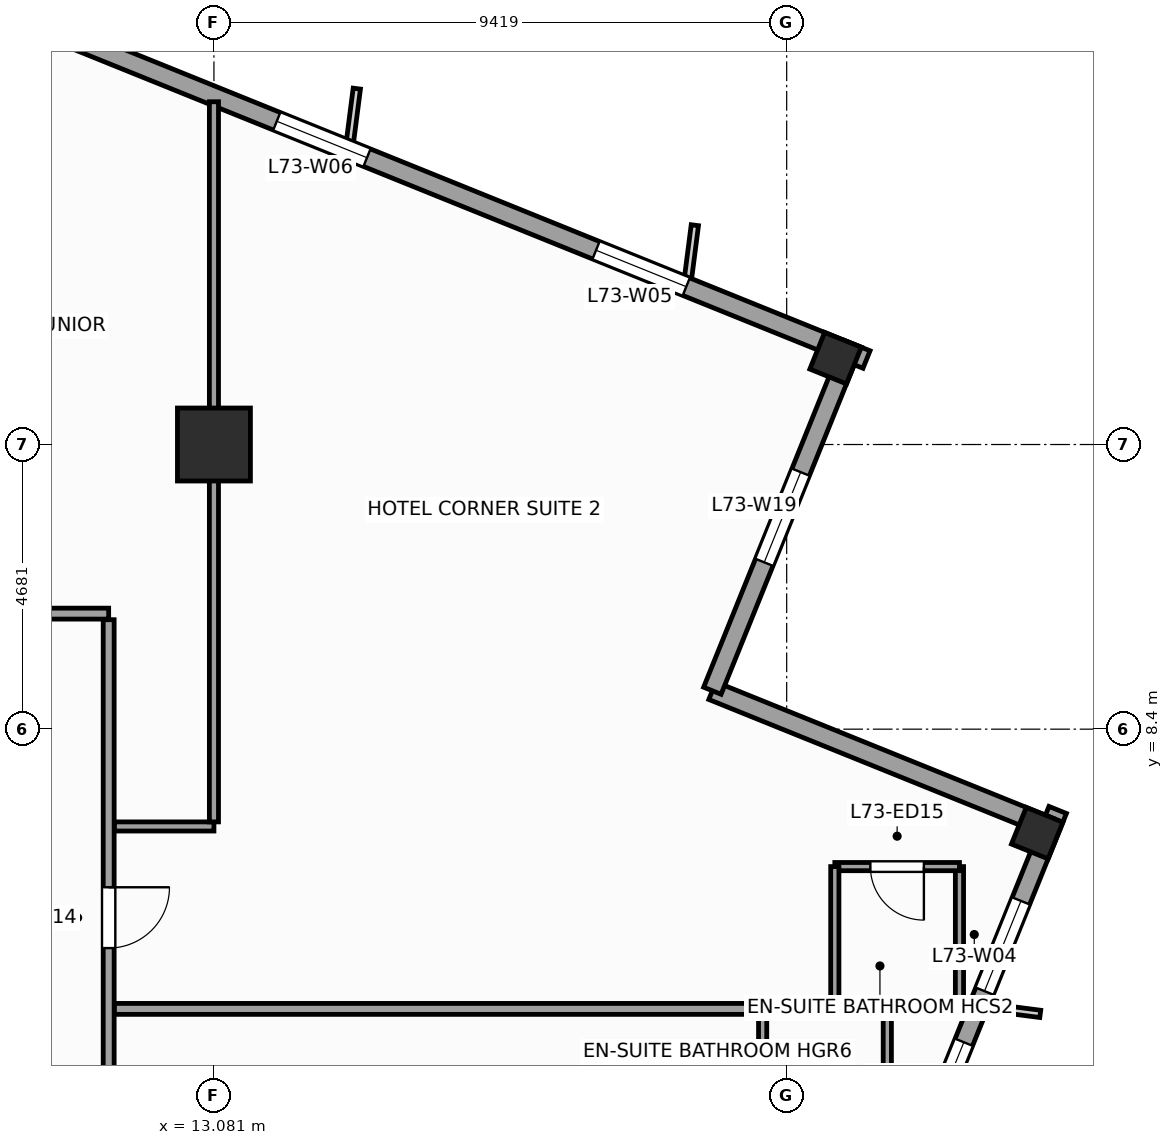
"""IFC4 building model, lengths in metres.
Left out: names, types, materials, properties, quantities, classifications, styles, units other than length and angle.
Written with IfcOpenShell. Run it as: python <this file> out.ifc"""

import sys

from ifc_helpers import new_model, si_unit, direction, frame, frame_2d, origin, origin_2d, place, context, subcontext, project, spatial, rectangle, extrude, source, transform, mapped, element, fill, save


model = new_model("IFC4")
c1 = context("Model", 3, precision=1e-05, world=origin(), true_north=direction((0.0, 1.0)))
c2 = subcontext(c1, "Body", "Model", "MODEL_VIEW")
j1 = project(units=[si_unit("LENGTHUNIT", "METRE"), si_unit("PLANEANGLEUNIT", "RADIAN")], contexts=[c1])
p1 = place(None, origin())
s1 = spatial("IfcSite", under=j1, at=p1, CompositionType="ELEMENT")
p2 = place(p1, origin())
s2 = spatial("IfcBuilding", under=s1, at=p2, CompositionType="ELEMENT")
p3 = place(p2, frame((0.0, 0.0, 297.6)))
s3 = spatial("IfcBuildingStorey", under=s2, at=p3, CompositionType="ELEMENT", Elevation=297.6)
m1 = source(origin(), c2, "Body", "SweptSolid", [
    extrude(rectangle(XDim=1.2, YDim=1.2, at=origin_2d()), origin(), (0.0, 0.0, 1.0), 3.6),
])
p4 = place(p3, frame((13.081, 13.081, 0.0), z_axis=(0.0, 0.0, 1.0), x_axis=(1.0, 0.0, 0.0)))
e1 = element("IfcColumn", 1, at=p4, inside=s3, PredefinedType="COLUMN", context=c2, shape_type="MappedRepresentation", body=[
    mapped(m1, transform((0.0, 0.0, 0.0), scale=1.0)),
])
m2 = source(origin(), c2, "Body", "SweptSolid", [
    extrude(rectangle(XDim=0.65, YDim=0.65, at=origin_2d()), origin(), (0.0, 0.0, 1.0), 3.6),
])
for number, where, z_axis, x_axis in (
    (2, (26.62, 6.69, 0.0), (0.0, 0.0, 1.0), (0.375, 0.927, 0.0)),
    (3, (23.304, 14.501, 0.0), (0.0, 0.0, 1.0), (0.375, 0.927, 0.0)),
):
    element("IfcColumn", number, at=place(p3, frame(where, z_axis=z_axis, x_axis=x_axis)), inside=s3, PredefinedType="COLUMN", context=c2, shape_type="MappedRepresentation", body=[
        mapped(m2, transform((0.0, 0.0, 0.0), scale=1.0)),
    ])
p5 = place(p3, frame((14.479, -23.813, 0.0), z_axis=(0.0, 0.0, 1.0), x_axis=(0.374609557019, 0.927182657188, 0.0)))
e4 = element("IfcWall", 4, at=p5, inside=s3, PredefinedType="STANDARD", context=c2, shape_type="SweptSolid", body=[
    extrude(rectangle(XDim=33.31, YDim=0.31, at=frame_2d((16.655, 0.0))), origin(), (0.0, 0.0, 1.0), 2.75),
])
p6 = place(p5, frame((3.197, 0.0, 0.47)))
e5 = element("IfcOpeningElement", 5, at=p6, cuts=e4, PredefinedType="OPENING", context=c2, shape_type="SweptSolid", body=[
    extrude(rectangle(XDim=1.6, YDim=2.1, at=frame_2d((0.8, 1.05))), frame((0.0, 0.165, 0.0), z_axis=(0.0, -1.0, 0.0), x_axis=(1.0, 0.0, 0.0)), (0.0, 0.0, 1.0), 0.33),
])
p7 = place(p5, frame((8.86, 0.0, 0.47)))
e6 = element("IfcOpeningElement", 6, at=p7, cuts=e4, PredefinedType="OPENING", context=c2, shape_type="SweptSolid", body=[
    extrude(rectangle(XDim=1.6, YDim=2.1, at=frame_2d((0.8, 1.05))), frame((0.0, 0.165, 0.0), z_axis=(0.0, -1.0, 0.0), x_axis=(1.0, 0.0, 0.0)), (0.0, 0.0, 1.0), 0.33),
])
p8 = place(p5, frame((14.439, 0.0, 0.47)))
e7 = element("IfcOpeningElement", 7, at=p8, cuts=e4, PredefinedType="OPENING", context=c2, shape_type="SweptSolid", body=[
    extrude(rectangle(XDim=1.6, YDim=2.1, at=frame_2d((0.8, 1.05))), frame((0.0, 0.165, 0.0), z_axis=(0.0, -1.0, 0.0), x_axis=(1.0, 0.0, 0.0)), (0.0, 0.0, 1.0), 0.33),
])
p9 = place(p5, frame((30.097, 0.0, 0.47)))
e8 = element("IfcOpeningElement", 8, at=p9, cuts=e4, PredefinedType="OPENING", context=c2, shape_type="SweptSolid", body=[
    extrude(rectangle(XDim=1.6, YDim=2.1, at=frame_2d((0.8, 1.05))), frame((0.0, 0.165, 0.0), z_axis=(0.0, -1.0, 0.0), x_axis=(1.0, 0.0, 0.0)), (0.0, 0.0, 1.0), 0.33),
])
p10 = place(p5, frame((27.59, 0.0, 0.47)))
e9 = element("IfcOpeningElement", 9, at=p10, cuts=e4, PredefinedType="OPENING", context=c2, shape_type="SweptSolid", body=[
    extrude(rectangle(XDim=1.6, YDim=2.1, at=frame_2d((0.8, 1.05))), frame((0.0, 0.165, 0.0), z_axis=(0.0, -1.0, 0.0), x_axis=(1.0, 0.0, 0.0)), (0.0, 0.0, 1.0), 0.33),
])
p11 = place(p5, frame((22.952, 0.0, 0.47)))
e10 = element("IfcOpeningElement", 10, at=p11, cuts=e4, PredefinedType="OPENING", context=c2, shape_type="SweptSolid", body=[
    extrude(rectangle(XDim=1.6, YDim=2.1, at=frame_2d((0.8, 1.05))), frame((0.0, 0.165, 0.0), z_axis=(0.0, -1.0, 0.0), x_axis=(1.0, 0.0, 0.0)), (0.0, 0.0, 1.0), 0.33),
])
p12 = place(p3, frame((26.841, 6.784, 0.0), z_axis=(0.0, 0.0, 1.0), x_axis=(-0.927171722085, 0.374636620962, 0.0)))
e11 = element("IfcWall", 11, at=p12, inside=s3, PredefinedType="STANDARD", context=c2, shape_type="SweptSolid", body=[
    extrude(rectangle(XDim=6.0, YDim=0.31, at=frame_2d((3.0, 0.0))), origin(), (0.0, 0.0, 1.0), 2.65),
])
p13 = place(p3, frame((21.278, 9.032, 0.0), z_axis=(0.0, 0.0, 1.0), x_axis=(0.374602739196, 0.927185411764, 0.0)))
e12 = element("IfcWall", 12, at=p13, inside=s3, PredefinedType="STANDARD", context=c2, shape_type="SweptSolid", body=[
    extrude(rectangle(XDim=6.155, YDim=0.31, at=frame_2d((3.078, 0.0))), origin(), (0.0, 0.0, 1.0), 3.35),
])
p14 = place(p13, frame((2.278, 0.0, 0.47)))
e13 = element("IfcOpeningElement", 13, at=p14, cuts=e12, PredefinedType="OPENING", context=c2, shape_type="SweptSolid", body=[
    extrude(rectangle(XDim=1.6, YDim=2.1, at=frame_2d((0.8, 1.05))), frame((0.0, 0.165, 0.0), z_axis=(0.0, -1.0, 0.0), x_axis=(1.0, 0.0, 0.0)), (0.0, 0.0, 1.0), 0.33),
])
p15 = place(p3, frame((23.813, 14.479, 0.0), z_axis=(0.0, 0.0, 1.0), x_axis=(-0.927182657188, 0.374609557019, 0.0)))
e14 = element("IfcWall", 14, at=p15, inside=s3, PredefinedType="STANDARD", context=c2, shape_type="SweptSolid", body=[
    extrude(rectangle(XDim=33.31, YDim=0.31, at=frame_2d((16.655, 0.0))), origin(), (0.0, 0.0, 1.0), 2.75),
])
p16 = place(p15, frame((22.58, 0.0, 0.0)))
e15 = element("IfcOpeningElement", 15, at=p16, cuts=e14, PredefinedType="OPENING", context=c2, shape_type="SweptSolid", body=[
    extrude(rectangle(XDim=1.05, YDim=2.25, at=frame_2d((0.525, 1.125))), frame((0.0, 0.165, 0.0), z_axis=(0.0, -1.0, 0.0), x_axis=(1.0, 0.0, 0.0)), (0.0, 0.0, 1.0), 0.33),
])
p17 = place(p15, frame((3.197, 0.0, 0.47)))
e16 = element("IfcOpeningElement", 16, at=p17, cuts=e14, PredefinedType="OPENING", context=c2, shape_type="SweptSolid", body=[
    extrude(rectangle(XDim=1.6, YDim=2.1, at=frame_2d((0.8, 1.05))), frame((0.0, 0.165, 0.0), z_axis=(0.0, -1.0, 0.0), x_axis=(1.0, 0.0, 0.0)), (0.0, 0.0, 1.0), 0.33),
])
p18 = place(p15, frame((8.86, 0.0, 0.47)))
e17 = element("IfcOpeningElement", 17, at=p18, cuts=e14, PredefinedType="OPENING", context=c2, shape_type="SweptSolid", body=[
    extrude(rectangle(XDim=1.6, YDim=2.1, at=frame_2d((0.8, 1.05))), frame((0.0, 0.165, 0.0), z_axis=(0.0, -1.0, 0.0), x_axis=(1.0, 0.0, 0.0)), (0.0, 0.0, 1.0), 0.33),
])
p19 = place(p15, frame((14.439, 0.0, 0.47)))
e18 = element("IfcOpeningElement", 18, at=p19, cuts=e14, PredefinedType="OPENING", context=c2, shape_type="SweptSolid", body=[
    extrude(rectangle(XDim=1.6, YDim=2.1, at=frame_2d((0.8, 1.05))), frame((0.0, 0.165, 0.0), z_axis=(0.0, -1.0, 0.0), x_axis=(1.0, 0.0, 0.0)), (0.0, 0.0, 1.0), 0.33),
])
p20 = place(p15, frame((25.597, 0.0, 0.47)))
e19 = element("IfcOpeningElement", 19, at=p20, cuts=e14, PredefinedType="OPENING", context=c2, shape_type="SweptSolid", body=[
    extrude(rectangle(XDim=1.6, YDim=2.1, at=frame_2d((0.8, 1.05))), frame((0.0, 0.165, 0.0), z_axis=(0.0, -1.0, 0.0), x_axis=(1.0, 0.0, 0.0)), (0.0, 0.0, 1.0), 0.33),
])
p21 = place(p3, frame((-10.3, 10.3, 0.0), z_axis=(0.0, 0.0, 1.0), x_axis=(1.0, 0.0, 0.0)))
e20 = element("IfcWall", 20, at=p21, inside=s3, PredefinedType="PARTITIONING", context=c2, shape_type="SweptSolid", body=[
    extrude(rectangle(XDim=21.65, YDim=0.18, at=frame_2d((10.825, 0.0))), origin(), (0.0, 0.0, 1.0), 3.35),
])
p22 = place(p21, frame((2.564, 0.0, 0.0)))
e21 = element("IfcOpeningElement", 21, at=p22, cuts=e20, PredefinedType="OPENING", context=c2, shape_type="SweptSolid", body=[
    extrude(rectangle(XDim=1.0, YDim=2.15, at=frame_2d((0.5, 1.075))), frame((0.0, 0.1, 0.0), z_axis=(0.0, -1.0, 0.0), x_axis=(1.0, 0.0, 0.0)), (0.0, 0.0, 1.0), 0.2),
])
p23 = place(p21, frame((8.05, 0.0, 0.0)))
e22 = element("IfcOpeningElement", 22, at=p23, cuts=e20, PredefinedType="OPENING", context=c2, shape_type="SweptSolid", body=[
    extrude(rectangle(XDim=1.0, YDim=2.15, at=frame_2d((0.5, 1.075))), frame((0.0, 0.1, 0.0), z_axis=(0.0, -1.0, 0.0), x_axis=(1.0, 0.0, 0.0)), (0.0, 0.0, 1.0), 0.2),
])
p24 = place(p21, frame((12.54, 0.0, 0.0)))
e23 = element("IfcOpeningElement", 23, at=p24, cuts=e20, PredefinedType="OPENING", context=c2, shape_type="SweptSolid", body=[
    extrude(rectangle(XDim=1.0, YDim=2.15, at=frame_2d((0.5, 1.075))), frame((0.0, 0.1, 0.0), z_axis=(0.0, -1.0, 0.0), x_axis=(1.0, 0.0, 0.0)), (0.0, 0.0, 1.0), 0.2),
])
p25 = place(p21, frame((18.871, 0.0, 0.0)))
e24 = element("IfcOpeningElement", 24, at=p25, cuts=e20, PredefinedType="OPENING", context=c2, shape_type="SweptSolid", body=[
    extrude(rectangle(XDim=1.0, YDim=2.15, at=frame_2d((0.5, 1.075))), frame((0.0, 0.1, 0.0), z_axis=(0.0, -1.0, 0.0), x_axis=(1.0, 0.0, 0.0)), (0.0, 0.0, 1.0), 0.2),
])
p26 = place(p3, frame((11.35, -12.35, 0.0), z_axis=(0.0, 0.0, 1.0), x_axis=(0.0, 1.0, 0.0)))
e25 = element("IfcWall", 25, at=p26, inside=s3, PredefinedType="PARTITIONING", context=c2, shape_type="SweptSolid", body=[
    extrude(rectangle(XDim=22.55, YDim=0.18, at=frame_2d((11.275, 0.0))), origin(), (0.0, 0.0, 1.0), 3.35),
])
p27 = place(p26, frame((17.15, 0.0, 0.0)))
e26 = element("IfcOpeningElement", 26, at=p27, cuts=e25, PredefinedType="OPENING", context=c2, shape_type="SweptSolid", body=[
    extrude(rectangle(XDim=1.0, YDim=2.15, at=frame_2d((0.5, 1.075))), frame((0.0, 0.1, 0.0), z_axis=(0.0, -1.0, 0.0), x_axis=(1.0, 0.0, 0.0)), (0.0, 0.0, 1.0), 0.2),
])
p28 = place(p26, frame((13.5, 0.0, 0.0)))
e27 = element("IfcOpeningElement", 27, at=p28, cuts=e25, PredefinedType="OPENING", context=c2, shape_type="SweptSolid", body=[
    extrude(rectangle(XDim=1.0, YDim=2.15, at=frame_2d((0.5, 1.075))), frame((0.0, 0.1, 0.0), z_axis=(0.0, -1.0, 0.0), x_axis=(1.0, 0.0, 0.0)), (0.0, 0.0, 1.0), 0.2),
])
p29 = place(p26, frame((9.5, 0.0, 0.0)))
e28 = element("IfcOpeningElement", 28, at=p29, cuts=e25, PredefinedType="OPENING", context=c2, shape_type="SweptSolid", body=[
    extrude(rectangle(XDim=1.0, YDim=2.15, at=frame_2d((0.5, 1.075))), frame((0.0, 0.1, 0.0), z_axis=(0.0, -1.0, 0.0), x_axis=(1.0, 0.0, 0.0)), (0.0, 0.0, 1.0), 0.2),
])
p30 = place(p26, frame((6.35, 0.0, 0.0)))
e29 = element("IfcOpeningElement", 29, at=p30, cuts=e25, PredefinedType="OPENING", context=c2, shape_type="SweptSolid", body=[
    extrude(rectangle(XDim=1.0, YDim=2.15, at=frame_2d((0.5, 1.075))), frame((0.0, 0.1, 0.0), z_axis=(0.0, -1.0, 0.0), x_axis=(1.0, 0.0, 0.0)), (0.0, 0.0, 1.0), 0.2),
])
p31 = place(p26, frame((2.439, 0.0, 0.0)))
e30 = element("IfcOpeningElement", 30, at=p31, cuts=e25, PredefinedType="OPENING", context=c2, shape_type="SweptSolid", body=[
    extrude(rectangle(XDim=1.0, YDim=2.15, at=frame_2d((0.5, 1.075))), frame((0.0, 0.1, 0.0), z_axis=(0.0, -1.0, 0.0), x_axis=(1.0, 0.0, 0.0)), (0.0, 0.0, 1.0), 0.2),
])
p32 = place(p3, frame((11.445, 3.8, 0.0), z_axis=(0.0, 0.0, 1.0), x_axis=(1.0, 0.0, 0.0)))
e31 = element("IfcWall", 31, at=p32, inside=s3, PredefinedType="PARTITIONING", context=c2, shape_type="SweptSolid", body=[
    extrude(rectangle(XDim=14.093, YDim=0.18, at=frame_2d((7.046, 0.0))), origin(), (0.0, 0.0, 1.0), 3.35),
])
p33 = place(p3, frame((11.445, 6.8, 0.0), z_axis=(0.0, 0.0, 1.0), x_axis=(1.0, 0.0, 0.0)))
e32 = element("IfcWall", 32, at=p33, inside=s3, PredefinedType="PARTITIONING", context=c2, shape_type="SweptSolid", body=[
    extrude(rectangle(XDim=1.636, YDim=0.15, at=frame_2d((0.818, 0.0))), origin(), (0.0, 0.0, 1.0), 3.35),
])
p34 = place(p3, frame((13.081, 6.875, 0.0), z_axis=(0.0, 0.0, 1.0), x_axis=(0.0, 1.0, 0.0)))
e33 = element("IfcWall", 33, at=p34, inside=s3, PredefinedType="PARTITIONING", context=c2, shape_type="SweptSolid", body=[
    extrude(rectangle(XDim=11.843, YDim=0.15, at=frame_2d((5.921, 0.0))), origin(), (0.0, 0.0, 1.0), 2.45),
])
p35 = place(p3, frame((25.342, 3.89, 0.0), z_axis=(0.0, 0.0, 1.0), x_axis=(0.0, 1.0, 0.0)))
e34 = element("IfcWall", 34, at=p35, inside=s3, PredefinedType="PARTITIONING", context=c2, shape_type="SweptSolid", body=[
    extrude(rectangle(XDim=2.25, YDim=0.135, at=frame_2d((1.125, 0.0))), origin(), (0.0, 0.0, 1.0), 2.75),
])
p36 = place(p3, frame((23.292, 6.14, 0.0), z_axis=(0.0, 0.0, 1.0), x_axis=(1.0, 0.0, 0.0)))
e35 = element("IfcWall", 35, at=p36, inside=s3, PredefinedType="PARTITIONING", context=c2, shape_type="SweptSolid", body=[
    extrude(rectangle(XDim=2.05, YDim=0.135, at=frame_2d((1.025, 0.0))), origin(), (0.0, 0.0, 1.0), 3.35),
])
p37 = place(p36, frame((0.585, 0.0, 0.0)))
e36 = element("IfcOpeningElement", 36, at=p37, cuts=e35, PredefinedType="OPENING", context=c2, shape_type="SweptSolid", body=[
    extrude(rectangle(XDim=0.88, YDim=2.1, at=frame_2d((0.44, 1.05))), frame((0.0, 0.078, 0.0), z_axis=(0.0, -1.0, 0.0), x_axis=(1.0, 0.0, 0.0)), (0.0, 0.0, 1.0), 0.155),
])
p38 = place(p3, frame((23.292, 3.89, 0.0), z_axis=(0.0, 0.0, 1.0), x_axis=(0.0, 1.0, 0.0)))
e37 = element("IfcWall", 37, at=p38, inside=s3, PredefinedType="PARTITIONING", context=c2, shape_type="SweptSolid", body=[
    extrude(rectangle(XDim=2.25, YDim=0.135, at=frame_2d((1.125, 0.0))), origin(), (0.0, 0.0, 1.0), 2.95),
])
for number, where, z_axis, x_axis in (
    (38, (24.155, 1.46, 0.0), (0.0, 0.0, 1.0), (0.0, 1.0, 0.0)),
    (39, (22.105, 1.46, 0.0), (0.0, 0.0, 1.0), (0.0, 1.0, 0.0)),
):
    element("IfcWall", number, at=place(p3, frame(where, z_axis=z_axis, x_axis=x_axis)), inside=s3, PredefinedType="PARTITIONING", context=c2, shape_type="SweptSolid", body=[
        extrude(rectangle(XDim=2.25, YDim=0.135, at=frame_2d((1.125, 0.0))), origin(), (0.0, 0.0, 1.0), 3.35),
    ])
m3 = source(origin(), c2, "Body", "SweptSolid", [
    extrude(rectangle(XDim=1.6, YDim=2.1, at=frame_2d((0.8, 1.05))), frame((0.0, 0.03, 0.0), z_axis=(0.0, -1.0, 0.0), x_axis=(1.0, 0.0, 0.0)), (0.0, 0.0, 1.0), 0.06),
])
p39 = place(p9, origin())
e40 = element("IfcWindow", 40, at=p39, inside=s3, PartitioningType="SINGLE_PANEL", PredefinedType="WINDOW", context=c2, shape_type="MappedRepresentation", body=[
    mapped(m3, transform((0.0, 0.0, 0.0), scale=1.0)),
])
fill(e8, e40)
p40 = place(p17, origin())
e41 = element("IfcWindow", 41, at=p40, inside=s3, PartitioningType="SINGLE_PANEL", PredefinedType="WINDOW", context=c2, shape_type="MappedRepresentation", body=[
    mapped(m3, transform((0.0, 0.0, 0.0), scale=1.0)),
])
fill(e16, e41)
p41 = place(p18, origin())
e42 = element("IfcWindow", 42, at=p41, inside=s3, PartitioningType="SINGLE_PANEL", PredefinedType="WINDOW", context=c2, shape_type="MappedRepresentation", body=[
    mapped(m3, transform((0.0, 0.0, 0.0), scale=1.0)),
])
fill(e17, e42)
p42 = place(p14, origin())
e43 = element("IfcWindow", 43, at=p42, inside=s3, PartitioningType="SINGLE_PANEL", PredefinedType="WINDOW", context=c2, shape_type="MappedRepresentation", body=[
    mapped(m3, transform((0.0, 0.0, 0.0), scale=1.0)),
])
fill(e13, e43)
m4 = source(origin(), c2, "Body", "SweptSolid", [
    extrude(rectangle(XDim=1.0, YDim=2.15, at=frame_2d((0.5, 1.075))), frame((0.0, 0.025, 0.0), z_axis=(0.0, -1.0, 0.0), x_axis=(1.0, 0.0, 0.0)), (0.0, 0.0, 1.0), 0.05),
])
p43 = place(p27, frame((1.0, 0.0, 0.0), z_axis=(0.0, 0.0, 1.0), x_axis=(-1.0, 0.0, 0.0)))
e44 = element("IfcDoor", 44, at=p43, inside=s3, OperationType="SINGLE_SWING_RIGHT", PredefinedType="DOOR", context=c2, shape_type="MappedRepresentation", body=[
    mapped(m4, transform((0.0, 0.0, 0.0), scale=1.0)),
])
fill(e26, e44)
m5 = source(origin(), c2, "Body", "SweptSolid", [
    extrude(rectangle(XDim=0.88, YDim=2.1, at=frame_2d((0.44, 1.05))), frame((0.0, 0.025, 0.0), z_axis=(0.0, -1.0, 0.0), x_axis=(1.0, 0.0, 0.0)), (0.0, 0.0, 1.0), 0.05),
])
p44 = place(p37, frame((0.88, 0.0, 0.0), z_axis=(0.0, 0.0, 1.0), x_axis=(-1.0, 0.0, 0.0)))
e45 = element("IfcDoor", 45, at=p44, inside=s3, OperationType="SINGLE_SWING_RIGHT", PredefinedType="DOOR", context=c2, shape_type="MappedRepresentation", body=[
    mapped(m5, transform((0.0, 0.0, 0.0), scale=1.0)),
])
fill(e36, e45)
p45 = place(p10, origin())
e46 = element("IfcWindow", 46, at=p45, inside=s3, PartitioningType="SINGLE_PANEL", PredefinedType="WINDOW", context=c2, shape_type="MappedRepresentation", body=[
    mapped(m3, transform((0.0, 0.0, 0.0), scale=1.0)),
])
fill(e9, e46)
save(model, sys.argv[1])
